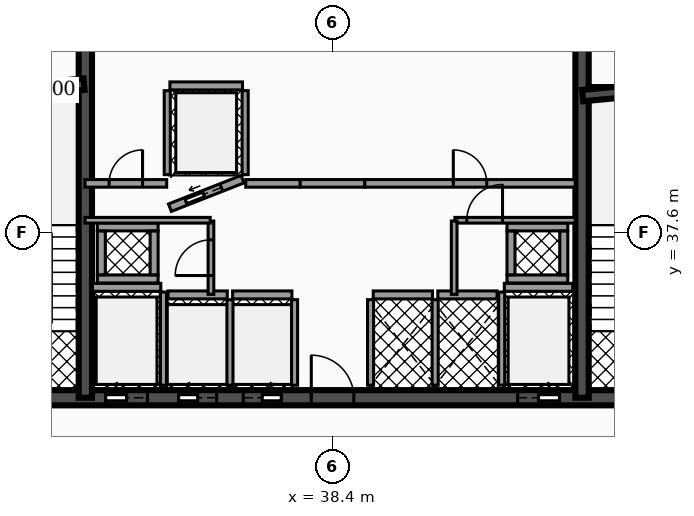
"""IFC4 building model, lengths in metres.
Left out: names, types, materials, properties, quantities, classifications, styles, units other than length and angle.
Written with IfcOpenShell. Run it as: python <this file> out.ifc"""

import sys

from ifc_helpers import new_model, si_unit, direction, frame, frame_2d, origin, place, context, subcontext, project, spatial, rectangle, extrude, element, fill, save


model = new_model("IFC4")
c1 = context("Model", 3, precision=1e-05, world=origin(), true_north=direction((0.0, 1.0)))
c2 = subcontext(c1, "Body", "Model", "MODEL_VIEW")
j1 = project(units=[si_unit("LENGTHUNIT", "METRE"), si_unit("PLANEANGLEUNIT", "RADIAN")], contexts=[c1])
p1 = place(None, origin())
s1 = spatial("IfcSite", under=j1, at=p1, CompositionType="ELEMENT")
p2 = place(p1, origin())
s2 = spatial("IfcBuilding", under=s1, at=p2, CompositionType="ELEMENT")
p3 = place(p2, frame((0.0, 0.0, 168.3)))
s3 = spatial("IfcBuildingStorey", under=s2, at=p3, CompositionType="ELEMENT", Elevation=168.3)
p4 = place(p3, frame((28.4, 33.25, 0.0), z_axis=(0.0, 0.0, 1.0), x_axis=(1.0, 0.0, 0.0)))
e1 = element("IfcWall", 1, at=p4, inside=s3, PredefinedType="SHEAR", context=c2, shape_type="SweptSolid", body=[
    extrude(rectangle(XDim=20.06, YDim=0.4, at=frame_2d((10.03, 0.0))), origin(), (0.0, 0.0, 1.0), 3.5),
])
p5 = place(p4, frame((4.03, 0.0, 0.0)))
e2 = element("IfcOpeningElement", 2, at=p5, cuts=e1, PredefinedType="OPENING", context=c2, shape_type="SweptSolid", body=[
    extrude(rectangle(XDim=1.1, YDim=2.15, at=frame_2d((0.55, 1.075))), frame((0.0, 0.21, 0.0), z_axis=(0.0, -1.0, 0.0), x_axis=(1.0, 0.0, 0.0)), (0.0, 0.0, 1.0), 0.42),
])
p6 = place(p4, frame((14.87, 0.0, 0.0)))
e3 = element("IfcOpeningElement", 3, at=p6, cuts=e1, PredefinedType="OPENING", context=c2, shape_type="SweptSolid", body=[
    extrude(rectangle(XDim=1.1, YDim=2.15, at=frame_2d((0.55, 1.075))), frame((0.0, 0.21, 0.0), z_axis=(0.0, -1.0, 0.0), x_axis=(1.0, 0.0, 0.0)), (0.0, 0.0, 1.0), 0.42),
])
p7 = place(p4, frame((5.95, 0.0, 0.0)))
e4 = element("IfcOpeningElement", 4, at=p7, cuts=e1, PredefinedType="OPENING", context=c2, shape_type="SweptSolid", body=[
    extrude(rectangle(XDim=1.0, YDim=2.1, at=frame_2d((0.5, 1.05))), frame((0.0, 0.21, 0.0), z_axis=(0.0, -1.0, 0.0), x_axis=(1.0, 0.0, 0.0)), (0.0, 0.0, 1.0), 0.42),
])
p8 = place(p4, frame((7.65, 0.0, 0.0)))
e5 = element("IfcOpeningElement", 5, at=p8, cuts=e1, PredefinedType="OPENING", context=c2, shape_type="SweptSolid", body=[
    extrude(rectangle(XDim=1.0, YDim=2.1, at=frame_2d((0.5, 1.05))), frame((0.0, 0.21, 0.0), z_axis=(0.0, -1.0, 0.0), x_axis=(1.0, 0.0, 0.0)), (0.0, 0.0, 1.0), 0.42),
])
p9 = place(p4, frame((1.31, 0.0, 0.0)))
e6 = element("IfcOpeningElement", 6, at=p9, cuts=e1, PredefinedType="OPENING", context=c2, shape_type="SweptSolid", body=[
    extrude(rectangle(XDim=1.1, YDim=2.2, at=frame_2d((0.55, 1.1))), frame((0.0, 0.21, 0.0), z_axis=(0.0, -1.0, 0.0), x_axis=(1.0, 0.0, 0.0)), (0.0, 0.0, 1.0), 0.42),
])
p10 = place(p4, frame((9.44, 0.0, 0.0)))
e7 = element("IfcOpeningElement", 7, at=p10, cuts=e1, PredefinedType="OPENING", context=c2, shape_type="SweptSolid", body=[
    extrude(rectangle(XDim=1.12, YDim=2.05, at=frame_2d((0.56, 1.025))), frame((0.0, 0.21, 0.0), z_axis=(0.0, -1.0, 0.0), x_axis=(1.0, 0.0, 0.0)), (0.0, 0.0, 1.0), 0.42),
])
p11 = place(p4, frame((17.65, 0.0, 0.0)))
e8 = element("IfcOpeningElement", 8, at=p11, cuts=e1, PredefinedType="OPENING", context=c2, shape_type="SweptSolid", body=[
    extrude(rectangle(XDim=1.1, YDim=2.2, at=frame_2d((0.55, 1.1))), frame((0.0, 0.21, 0.0), z_axis=(0.0, -1.0, 0.0), x_axis=(1.0, 0.0, 0.0)), (0.0, 0.0, 1.0), 0.42),
])
for number, where, z_axis, x_axis in (
    (9, (31.895, 33.25, 0.0), (0.0, 0.0, 1.0), (0.0, 1.0, 0.0)),
    (10, (44.965, 33.25, 0.0), (0.0, 0.0, 1.0), (0.0, 1.0, 0.0)),
):
    element("IfcWall", number, at=place(p3, frame(where, z_axis=z_axis, x_axis=x_axis)), inside=s3, PredefinedType="SHEAR", context=c2, shape_type="SweptSolid", body=[
        extrude(rectangle(XDim=10.2, YDim=0.35, at=frame_2d((5.1, 0.0))), origin(), (0.0, 0.0, 1.0), 3.5),
    ])
p12 = place(p3, frame((28.64, 41.2, 0.0), z_axis=(0.0, 0.0, 1.0), x_axis=(0.995687118776, 0.092774789157, 0.0)))
e11 = element("IfcWall", 11, at=p12, inside=s3, PredefinedType="SHEAR", context=c2, shape_type="SweptSolid", body=[
    extrude(rectangle(XDim=3.234, YDim=0.3, at=frame_2d((1.617, 0.0))), origin(), (0.0, 0.0, 1.0), 3.5),
])
p13 = place(p3, frame((44.98, 41.2, 0.0), z_axis=(0.0, 0.0, 1.0), x_axis=(0.995686468965, 0.09278176286, 0.0)))
e12 = element("IfcWall", 12, at=p13, inside=s3, PredefinedType="SHEAR", context=c2, shape_type="SweptSolid", body=[
    extrude(rectangle(XDim=3.234, YDim=0.3, at=frame_2d((1.617, 0.0))), origin(), (0.0, 0.0, 1.0), 3.5),
])
p14 = place(p3, frame((32.08, 36.155, 0.0), z_axis=(0.0, 0.0, 1.0), x_axis=(1.0, 0.0, 0.0)))
e13 = element("IfcWall", 13, at=p14, inside=s3, PredefinedType="SOLIDWALL", context=c2, shape_type="SweptSolid", body=[
    extrude(rectangle(XDim=1.8, YDim=0.21, at=frame_2d((0.9, 0.0))), origin(), (0.0, 0.0, 1.0), 2.472),
])
p15 = place(p3, frame((33.95, 33.58, 0.0), z_axis=(0.0, 0.0, 1.0), x_axis=(0.0, 1.0, 0.0)))
e14 = element("IfcWall", 14, at=p15, inside=s3, PredefinedType="SOLIDWALL", context=c2, shape_type="SweptSolid", body=[
    extrude(rectangle(XDim=2.45, YDim=0.16, at=frame_2d((1.225, 0.0))), origin(), (0.0, 0.0, 1.0), 2.472),
])
p16 = place(p3, frame((42.92, 36.155, 0.0), z_axis=(0.0, 0.0, 1.0), x_axis=(1.0, 0.0, 0.0)))
e15 = element("IfcWall", 15, at=p16, inside=s3, PredefinedType="SOLIDWALL", context=c2, shape_type="SweptSolid", body=[
    extrude(rectangle(XDim=1.8, YDim=0.21, at=frame_2d((0.9, 0.0))), origin(), (0.0, 0.0, 1.0), 2.472),
])
p17 = place(p3, frame((42.85, 33.58, 0.0), z_axis=(0.0, 0.0, 1.0), x_axis=(0.0, 1.0, 0.0)))
e16 = element("IfcWall", 16, at=p17, inside=s3, PredefinedType="SOLIDWALL", context=c2, shape_type="SweptSolid", body=[
    extrude(rectangle(XDim=2.45, YDim=0.16, at=frame_2d((1.225, 0.0))), origin(), (0.0, 0.0, 1.0), 2.472),
])
p18 = place(p3, frame((34.07, 35.955, 0.0), z_axis=(0.0, 0.0, 1.0), x_axis=(1.0, 0.0, 0.0)))
e17 = element("IfcWall", 17, at=p18, inside=s3, PredefinedType="SOLIDWALL", context=c2, shape_type="SweptSolid", body=[
    extrude(rectangle(XDim=1.56, YDim=0.21, at=frame_2d((0.78, 0.0))), origin(), (0.0, 0.0, 1.0), 2.472),
])
p19 = place(p3, frame((35.7, 33.58, 0.0), z_axis=(0.0, 0.0, 1.0), x_axis=(0.0, 1.0, 0.0)))
e18 = element("IfcWall", 18, at=p19, inside=s3, PredefinedType="SOLIDWALL", context=c2, shape_type="SweptSolid", body=[
    extrude(rectangle(XDim=2.25, YDim=0.16, at=frame_2d((1.125, 0.0))), origin(), (0.0, 0.0, 1.0), 2.472),
])
p20 = place(p3, frame((35.77, 35.955, 0.0), z_axis=(0.0, 0.0, 1.0), x_axis=(1.0, 0.0, 0.0)))
e19 = element("IfcWall", 19, at=p20, inside=s3, PredefinedType="SOLIDWALL", context=c2, shape_type="SweptSolid", body=[
    extrude(rectangle(XDim=1.56, YDim=0.21, at=frame_2d((0.78, 0.0))), origin(), (0.0, 0.0, 1.0), 2.472),
])
p21 = place(p3, frame((37.4, 33.58, 0.0), z_axis=(0.0, 0.0, 1.0), x_axis=(0.0, 1.0, 0.0)))
e20 = element("IfcWall", 20, at=p21, inside=s3, PredefinedType="SOLIDWALL", context=c2, shape_type="SweptSolid", body=[
    extrude(rectangle(XDim=2.25, YDim=0.16, at=frame_2d((1.125, 0.0))), origin(), (0.0, 0.0, 1.0), 2.472),
])
p22 = place(p3, frame((34.12, 38.25, 0.0), z_axis=(0.0, 0.0, 1.0), x_axis=(0.930804993012, 0.36551616241, 0.0)))
e21 = element("IfcWall", 21, at=p22, inside=s3, PredefinedType="SOLIDWALL", context=c2, shape_type="SweptSolid", body=[
    extrude(rectangle(XDim=2.052, YDim=0.21, at=frame_2d((1.026, 0.0))), origin(), (0.0, 0.0, 1.0), 2.472),
])
p23 = place(p22, frame((0.455, 0.0, 0.0)))
e22 = element("IfcOpeningElement", 22, at=p23, cuts=e21, PredefinedType="OPENING", context=c2, shape_type="SweptSolid", body=[
    extrude(rectangle(XDim=1.0, YDim=2.1, at=frame_2d((0.5, 1.05))), frame((0.0, 0.115, 0.0), z_axis=(0.0, -1.0, 0.0), x_axis=(1.0, 0.0, 0.0)), (0.0, 0.0, 1.0), 0.23),
])
p24 = place(p3, frame((34.12, 41.455, 0.0), z_axis=(0.0, 0.0, 1.0), x_axis=(1.0, 0.0, 0.0)))
e23 = element("IfcWall", 23, at=p24, inside=s3, PredefinedType="SOLIDWALL", context=c2, shape_type="SweptSolid", body=[
    extrude(rectangle(XDim=1.91, YDim=0.21, at=frame_2d((0.955, 0.0))), origin(), (0.0, 0.0, 1.0), 2.472),
])
for number, where, z_axis, x_axis in (
    (24, (34.05, 39.12, 0.0), (0.0, 0.0, 1.0), (0.0, 1.0, 0.0)),
    (25, (36.1, 39.12, 0.0), (0.0, 0.0, 1.0), (0.0, 1.0, 0.0)),
):
    element("IfcWall", number, at=place(p3, frame(where, z_axis=z_axis, x_axis=x_axis)), inside=s3, PredefinedType="SOLIDWALL", context=c2, shape_type="SweptSolid", body=[
        extrude(rectangle(XDim=2.21, YDim=0.16, at=frame_2d((1.105, 0.0))), origin(), (0.0, 0.0, 1.0), 2.472),
    ])
p25 = place(p3, frame((39.47, 35.955, 0.0), z_axis=(0.0, 0.0, 1.0), x_axis=(1.0, 0.0, 0.0)))
e26 = element("IfcWall", 26, at=p25, inside=s3, PredefinedType="SOLIDWALL", context=c2, shape_type="SweptSolid", body=[
    extrude(rectangle(XDim=1.56, YDim=0.21, at=frame_2d((0.78, 0.0))), origin(), (0.0, 0.0, 1.0), 2.472),
])
for number, where, z_axis, x_axis in (
    (27, (39.4, 33.58, 0.0), (0.0, 0.0, 1.0), (0.0, 1.0, 0.0)),
    (28, (41.1, 33.58, 0.0), (0.0, 0.0, 1.0), (0.0, 1.0, 0.0)),
):
    element("IfcWall", number, at=place(p3, frame(where, z_axis=z_axis, x_axis=x_axis)), inside=s3, PredefinedType="SOLIDWALL", context=c2, shape_type="SweptSolid", body=[
        extrude(rectangle(XDim=2.25, YDim=0.16, at=frame_2d((1.125, 0.0))), origin(), (0.0, 0.0, 1.0), 2.472),
    ])
p26 = place(p3, frame((41.17, 35.955, 0.0), z_axis=(0.0, 0.0, 1.0), x_axis=(1.0, 0.0, 0.0)))
e29 = element("IfcWall", 29, at=p26, inside=s3, PredefinedType="SOLIDWALL", context=c2, shape_type="SweptSolid", body=[
    extrude(rectangle(XDim=1.56, YDim=0.21, at=frame_2d((0.78, 0.0))), origin(), (0.0, 0.0, 1.0), 2.472),
])
for number, where, z_axis, x_axis in (
    (30, (32.21, 36.375, 0.0), (0.0, 0.0, 1.0), (1.0, 0.0, 0.0)),
    (31, (32.21, 37.745, 0.0), (0.0, 0.0, 1.0), (1.0, 0.0, 0.0)),
):
    element("IfcWall", number, at=place(p3, frame(where, z_axis=z_axis, x_axis=x_axis)), inside=s3, PredefinedType="SOLIDWALL", context=c2, shape_type="SweptSolid", body=[
        extrude(rectangle(XDim=1.6, YDim=0.21, at=frame_2d((0.8, 0.0))), origin(), (0.0, 0.0, 1.0), 3.5),
    ])
for number, where, z_axis, x_axis in (
    (32, (32.315, 36.485, 0.0), (0.0, 0.0, 1.0), (0.0, 1.0, 0.0)),
    (33, (33.705, 36.485, 0.0), (0.0, 0.0, 1.0), (0.0, 1.0, 0.0)),
):
    element("IfcWall", number, at=place(p3, frame(where, z_axis=z_axis, x_axis=x_axis)), inside=s3, PredefinedType="SOLIDWALL", context=c2, shape_type="SweptSolid", body=[
        extrude(rectangle(XDim=1.15, YDim=0.21, at=frame_2d((0.575, 0.0))), origin(), (0.0, 0.0, 1.0), 3.5),
    ])
for number, where, z_axis, x_axis in (
    (34, (42.99, 36.375, 0.0), (0.0, 0.0, 1.0), (1.0, 0.0, 0.0)),
    (35, (42.99, 37.745, 0.0), (0.0, 0.0, 1.0), (1.0, 0.0, 0.0)),
):
    element("IfcWall", number, at=place(p3, frame(where, z_axis=z_axis, x_axis=x_axis)), inside=s3, PredefinedType="SOLIDWALL", context=c2, shape_type="SweptSolid", body=[
        extrude(rectangle(XDim=1.6, YDim=0.21, at=frame_2d((0.8, 0.0))), origin(), (0.0, 0.0, 1.0), 3.5),
    ])
for number, where, z_axis, x_axis in (
    (36, (43.095, 36.485, 0.0), (0.0, 0.0, 1.0), (0.0, 1.0, 0.0)),
    (37, (44.485, 36.485, 0.0), (0.0, 0.0, 1.0), (0.0, 1.0, 0.0)),
):
    element("IfcWall", number, at=place(p3, frame(where, z_axis=z_axis, x_axis=x_axis)), inside=s3, PredefinedType="SOLIDWALL", context=c2, shape_type="SweptSolid", body=[
        extrude(rectangle(XDim=1.15, YDim=0.21, at=frame_2d((0.575, 0.0))), origin(), (0.0, 0.0, 1.0), 3.5),
    ])
p27 = place(p3, frame((35.2, 35.97, 0.0), z_axis=(0.0, 0.0, 1.0), x_axis=(0.0, 1.0, 0.0)))
e38 = element("IfcWall", 38, at=p27, inside=s3, PredefinedType="PARTITIONING", context=c2, shape_type="SweptSolid", body=[
    extrude(rectangle(XDim=1.93, YDim=0.15, at=frame_2d((0.965, 0.0))), origin(), (0.0, 0.0, 1.0), 2.457),
])
p28 = place(p27, frame((0.495, 0.0, 0.0)))
e39 = element("IfcOpeningElement", 39, at=p28, cuts=e38, PredefinedType="OPENING", context=c2, shape_type="SweptSolid", body=[
    extrude(rectangle(XDim=0.94, YDim=2.05, at=frame_2d((0.47, 1.025))), frame((0.0, 0.085, 0.0), z_axis=(0.0, -1.0, 0.0), x_axis=(1.0, 0.0, 0.0)), (0.0, 0.0, 1.0), 0.17),
])
p29 = place(p3, frame((31.885, 37.92, 0.0), z_axis=(0.0, 0.0, 1.0), x_axis=(1.0, 0.0, 0.0)))
e40 = element("IfcWall", 40, at=p29, inside=s3, PredefinedType="PARTITIONING", context=c2, shape_type="SweptSolid", body=[
    extrude(rectangle(XDim=3.295, YDim=0.15, at=frame_2d((1.647, 0.0))), origin(), (0.0, 0.0, 1.0), 2.457),
])
p30 = place(p3, frame((31.885, 38.89, 0.0), z_axis=(0.0, 0.0, 1.0), x_axis=(1.0, 0.0, 0.0)))
e41 = element("IfcWall", 41, at=p30, inside=s3, PredefinedType="PARTITIONING", context=c2, shape_type="SweptSolid", body=[
    extrude(rectangle(XDim=2.15, YDim=0.2, at=frame_2d((1.075, 0.0))), origin(), (0.0, 0.0, 1.0), 2.457),
])
p31 = place(p30, frame((0.635, 0.0, 0.0)))
e42 = element("IfcOpeningElement", 42, at=p31, cuts=e41, PredefinedType="OPENING", context=c2, shape_type="SweptSolid", body=[
    extrude(rectangle(XDim=0.88, YDim=2.05, at=frame_2d((0.44, 1.025))), frame((0.0, 0.11, 0.0), z_axis=(0.0, -1.0, 0.0), x_axis=(1.0, 0.0, 0.0)), (0.0, 0.0, 1.0), 0.22),
])
p32 = place(p3, frame((36.115, 38.89, 0.0), z_axis=(0.0, 0.0, 1.0), x_axis=(1.0, 0.0, 0.0)))
e43 = element("IfcWall", 43, at=p32, inside=s3, PredefinedType="PARTITIONING", context=c2, shape_type="SweptSolid", body=[
    extrude(rectangle(XDim=1.435, YDim=0.2, at=frame_2d((0.718, 0.0))), origin(), (0.0, 0.0, 1.0), 2.457),
])
p33 = place(p3, frame((37.55, 38.89, 0.0), z_axis=(0.0, 0.0, 1.0), x_axis=(1.0, 0.0, 0.0)))
e44 = element("IfcWall", 44, at=p33, inside=s3, PredefinedType="PARTITIONING", context=c2, shape_type="SweptSolid", body=[
    extrude(rectangle(XDim=1.7, YDim=0.2, at=frame_2d((0.85, 0.0))), origin(), (0.0, 0.0, 1.0), 2.457),
])
p34 = place(p3, frame((39.25, 38.89, 0.0), z_axis=(0.0, 0.0, 1.0), x_axis=(1.0, 0.0, 0.0)))
e45 = element("IfcWall", 45, at=p34, inside=s3, PredefinedType="PARTITIONING", context=c2, shape_type="SweptSolid", body=[
    extrude(rectangle(XDim=5.535, YDim=0.2, at=frame_2d((2.768, 0.0))), origin(), (0.0, 0.0, 1.0), 2.457),
])
p35 = place(p34, frame((2.327, 0.0, 0.0)))
e46 = element("IfcOpeningElement", 46, at=p35, cuts=e45, PredefinedType="OPENING", context=c2, shape_type="SweptSolid", body=[
    extrude(rectangle(XDim=0.88, YDim=2.05, at=frame_2d((0.44, 1.025))), frame((0.0, 0.11, 0.0), z_axis=(0.0, -1.0, 0.0), x_axis=(1.0, 0.0, 0.0)), (0.0, 0.0, 1.0), 0.22),
])
p36 = place(p3, frame((41.62, 37.92, 0.0), z_axis=(0.0, 0.0, 1.0), x_axis=(1.0, 0.0, 0.0)))
e47 = element("IfcWall", 47, at=p36, inside=s3, PredefinedType="PARTITIONING", context=c2, shape_type="SweptSolid", body=[
    extrude(rectangle(XDim=3.165, YDim=0.15, at=frame_2d((1.583, 0.0))), origin(), (0.0, 0.0, 1.0), 2.457),
])
p37 = place(p36, frame((0.312, 0.0, 0.0)))
e48 = element("IfcOpeningElement", 48, at=p37, cuts=e47, PredefinedType="OPENING", context=c2, shape_type="SweptSolid", body=[
    extrude(rectangle(XDim=0.94, YDim=2.05, at=frame_2d((0.47, 1.025))), frame((0.0, 0.085, 0.0), z_axis=(0.0, -1.0, 0.0), x_axis=(1.0, 0.0, 0.0)), (0.0, 0.0, 1.0), 0.17),
])
p38 = place(p3, frame((41.6, 35.97, 0.0), z_axis=(0.0, 0.0, 1.0), x_axis=(0.0, 1.0, 0.0)))
e49 = element("IfcWall", 49, at=p38, inside=s3, PredefinedType="PARTITIONING", context=c2, shape_type="SweptSolid", body=[
    extrude(rectangle(XDim=1.93, YDim=0.15, at=frame_2d((0.965, 0.0))), origin(), (0.0, 0.0, 1.0), 2.457),
])
p39 = place(p5, origin())
e50 = element("IfcDoor", 50, at=p39, inside=s3, OperationType="SLIDING_TO_LEFT", PredefinedType="DOOR", context=c2, shape_type="SweptSolid", body=[
    extrude(rectangle(XDim=1.1, YDim=2.15, at=frame_2d((0.55, 1.075))), frame((0.0, 0.025, 0.0), z_axis=(0.0, -1.0, 0.0), x_axis=(1.0, 0.0, 0.0)), (0.0, 0.0, 1.0), 0.05),
])
fill(e2, e50)
p40 = place(p6, origin())
e51 = element("IfcDoor", 51, at=p40, inside=s3, OperationType="SLIDING_TO_RIGHT", PredefinedType="DOOR", context=c2, shape_type="SweptSolid", body=[
    extrude(rectangle(XDim=1.1, YDim=2.15, at=frame_2d((0.55, 1.075))), frame((0.0, 0.025, 0.0), z_axis=(0.0, -1.0, 0.0), x_axis=(1.0, 0.0, 0.0)), (0.0, 0.0, 1.0), 0.05),
])
fill(e3, e51)
p41 = place(p7, origin())
e52 = element("IfcDoor", 52, at=p41, inside=s3, OperationType="SLIDING_TO_LEFT", PredefinedType="DOOR", context=c2, shape_type="SweptSolid", body=[
    extrude(rectangle(XDim=1.0, YDim=2.1, at=frame_2d((0.5, 1.05))), frame((0.0, 0.025, 0.0), z_axis=(0.0, -1.0, 0.0), x_axis=(1.0, 0.0, 0.0)), (0.0, 0.0, 1.0), 0.05),
])
fill(e4, e52)
p42 = place(p8, origin())
e53 = element("IfcDoor", 53, at=p42, inside=s3, OperationType="SLIDING_TO_RIGHT", PredefinedType="DOOR", context=c2, shape_type="SweptSolid", body=[
    extrude(rectangle(XDim=1.0, YDim=2.1, at=frame_2d((0.5, 1.05))), frame((0.0, 0.025, 0.0), z_axis=(0.0, -1.0, 0.0), x_axis=(1.0, 0.0, 0.0)), (0.0, 0.0, 1.0), 0.05),
])
fill(e5, e53)
p43 = place(p23, origin())
e54 = element("IfcDoor", 54, at=p43, inside=s3, OperationType="SLIDING_TO_LEFT", PredefinedType="DOOR", context=c2, shape_type="SweptSolid", body=[
    extrude(rectangle(XDim=1.0, YDim=2.1, at=frame_2d((0.5, 1.05))), frame((0.0, 0.025, 0.0), z_axis=(0.0, -1.0, 0.0), x_axis=(1.0, 0.0, 0.0)), (0.0, 0.0, 1.0), 0.05),
])
fill(e22, e54)
p44 = place(p10, origin())
e55 = element("IfcDoor", 55, at=p44, inside=s3, OperationType="SINGLE_SWING_LEFT", PredefinedType="DOOR", context=c2, shape_type="SweptSolid", body=[
    extrude(rectangle(XDim=1.12, YDim=2.05, at=frame_2d((0.56, 1.025))), frame((0.0, 0.025, 0.0), z_axis=(0.0, -1.0, 0.0), x_axis=(1.0, 0.0, 0.0)), (0.0, 0.0, 1.0), 0.05),
])
fill(e7, e55)
p45 = place(p28, origin())
e56 = element("IfcDoor", 56, at=p45, inside=s3, OperationType="SINGLE_SWING_LEFT", PredefinedType="DOOR", context=c2, shape_type="SweptSolid", body=[
    extrude(rectangle(XDim=0.94, YDim=2.05, at=frame_2d((0.47, 1.025))), frame((0.0, 0.025, 0.0), z_axis=(0.0, -1.0, 0.0), x_axis=(1.0, 0.0, 0.0)), (0.0, 0.0, 1.0), 0.05),
])
fill(e39, e56)
p46 = place(p31, origin())
e57 = element("IfcDoor", 57, at=p46, inside=s3, OperationType="SINGLE_SWING_RIGHT", PredefinedType="DOOR", context=c2, shape_type="SweptSolid", body=[
    extrude(rectangle(XDim=0.88, YDim=2.05, at=frame_2d((0.44, 1.025))), frame((0.0, 0.025, 0.0), z_axis=(0.0, -1.0, 0.0), x_axis=(1.0, 0.0, 0.0)), (0.0, 0.0, 1.0), 0.05),
])
fill(e42, e57)
p47 = place(p35, origin())
e58 = element("IfcDoor", 58, at=p47, inside=s3, OperationType="SINGLE_SWING_LEFT", PredefinedType="DOOR", context=c2, shape_type="SweptSolid", body=[
    extrude(rectangle(XDim=0.88, YDim=2.05, at=frame_2d((0.44, 1.025))), frame((0.0, 0.025, 0.0), z_axis=(0.0, -1.0, 0.0), x_axis=(1.0, 0.0, 0.0)), (0.0, 0.0, 1.0), 0.05),
])
fill(e46, e58)
p48 = place(p37, origin())
e59 = element("IfcDoor", 59, at=p48, inside=s3, OperationType="SINGLE_SWING_RIGHT", PredefinedType="DOOR", context=c2, shape_type="SweptSolid", body=[
    extrude(rectangle(XDim=0.94, YDim=2.05, at=frame_2d((0.47, 1.025))), frame((0.0, 0.025, 0.0), z_axis=(0.0, -1.0, 0.0), x_axis=(1.0, 0.0, 0.0)), (0.0, 0.0, 1.0), 0.05),
])
fill(e48, e59)
save(model, sys.argv[1])
